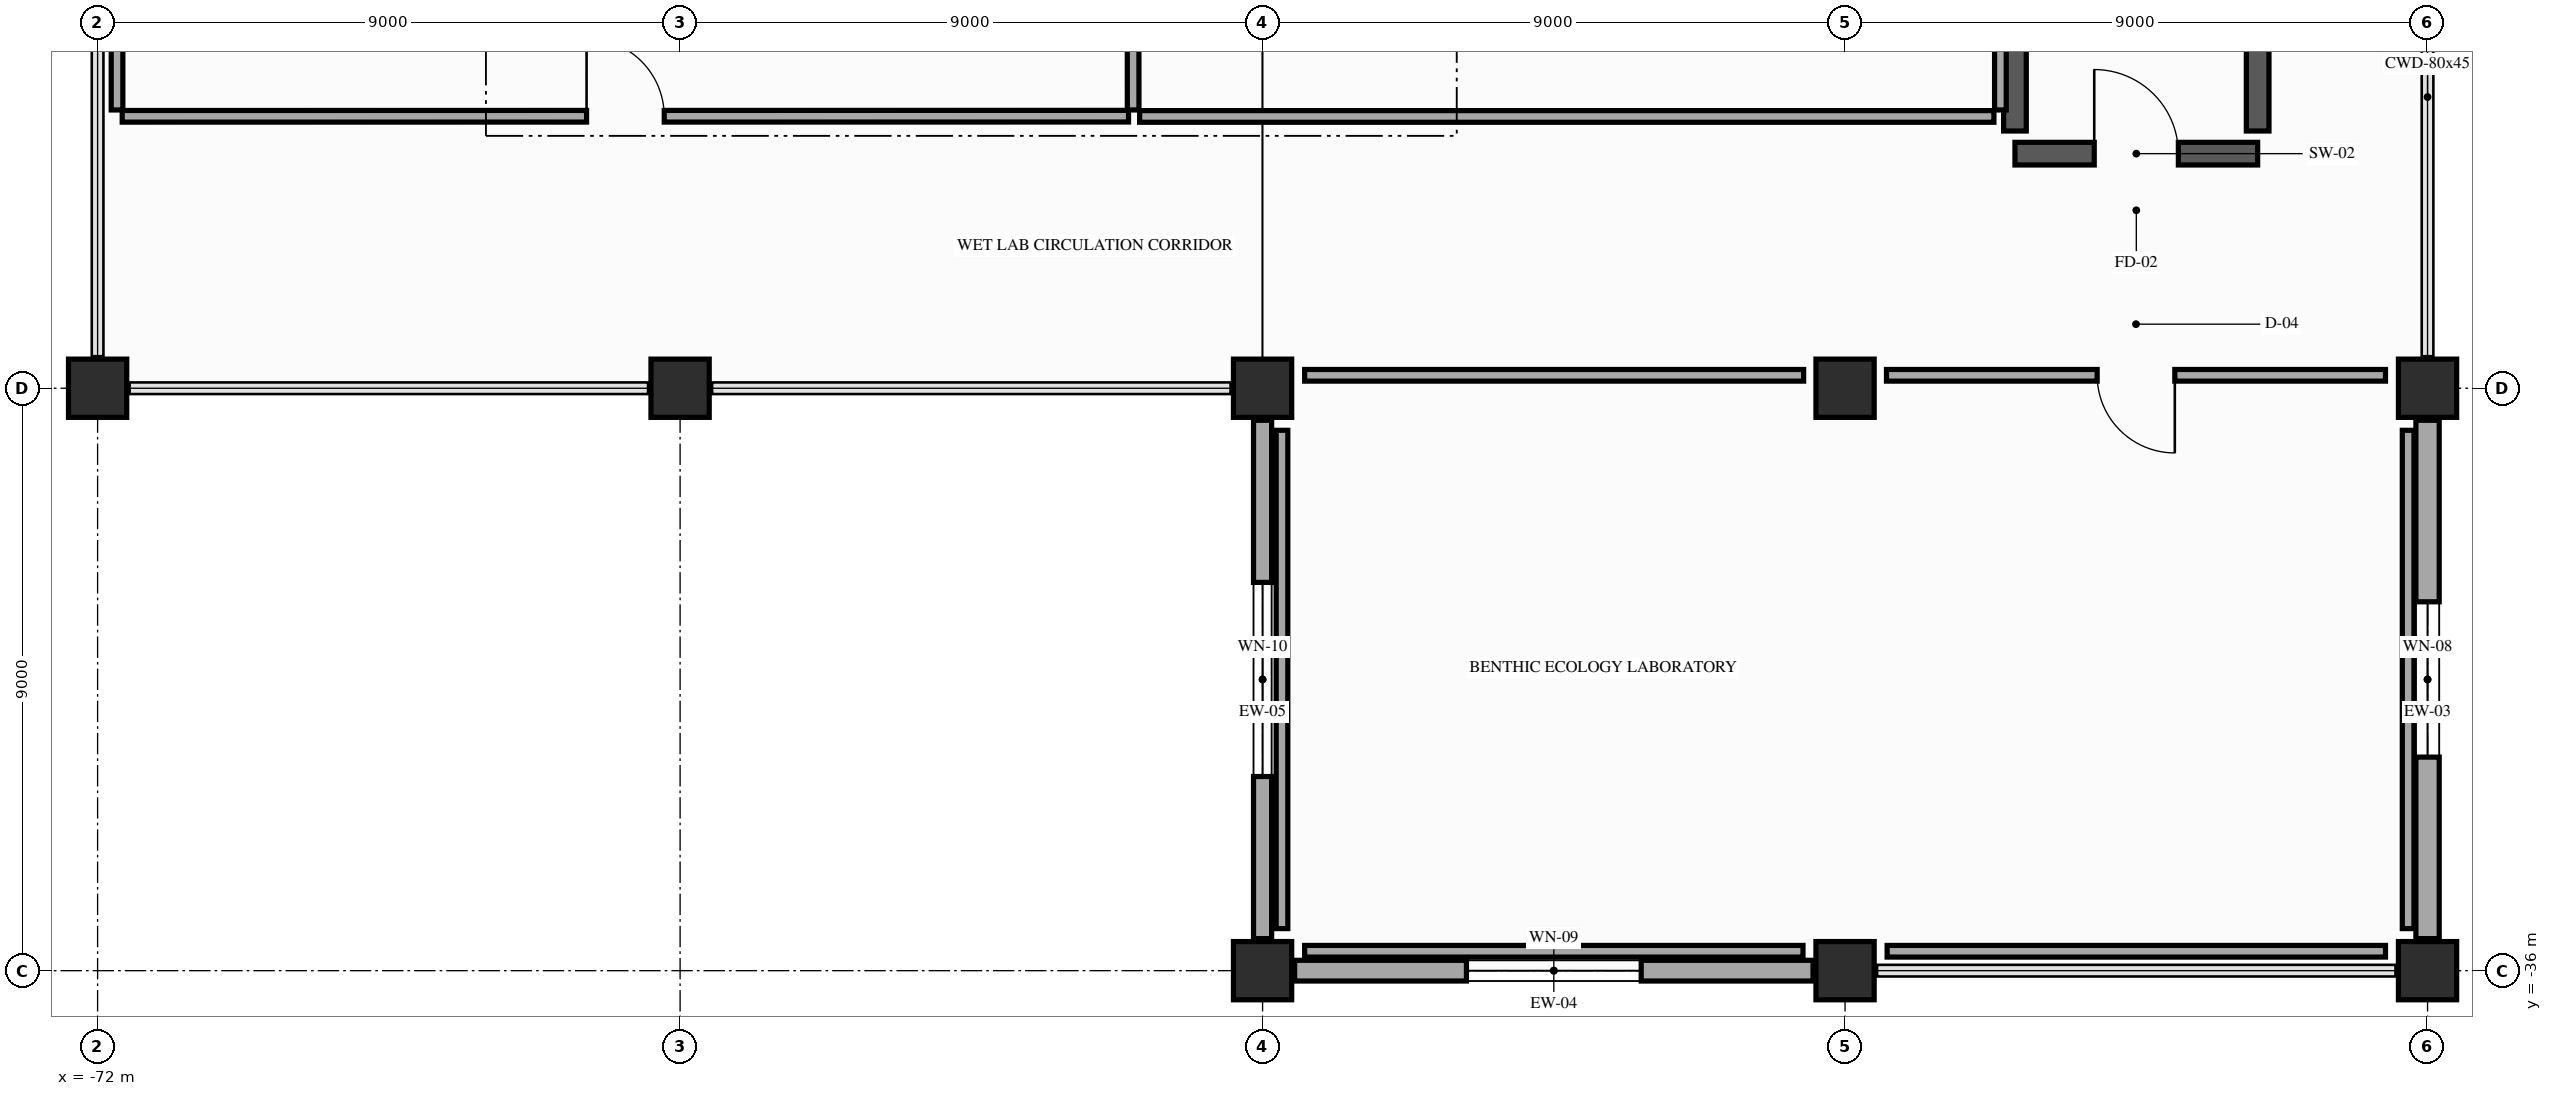
"""IFC4 building model, lengths in metres.
Left out: names, types, materials, properties, quantities, classifications, styles, units other than length and angle.
Written with IfcOpenShell. Run it as: python <this file> out.ifc"""

import sys

from ifc_helpers import new_model, si_unit, direction, frame, frame_2d, origin, origin_2d, place, context, subcontext, project, spatial, rectangle, extrude, element, fill, save


model = new_model("IFC4")
c1 = context("Model", 3, precision=1e-05, world=origin(), true_north=direction((0.0, 1.0)))
c2 = subcontext(c1, "Body", "Model", "MODEL_VIEW")
j1 = project(units=[si_unit("LENGTHUNIT", "METRE"), si_unit("PLANEANGLEUNIT", "RADIAN")], contexts=[c1])
p1 = place(None, origin())
s1 = spatial("IfcSite", under=j1, at=p1, CompositionType="ELEMENT")
p2 = place(p1, origin())
s2 = spatial("IfcBuilding", under=s1, at=p2, CompositionType="ELEMENT")
p3 = place(p2, frame((0.0, 0.0, 5.4)))
s3 = spatial("IfcBuildingStorey", under=s2, at=p3, CompositionType="ELEMENT", Elevation=5.4)
for number, where, z_axis, x_axis in (
    (1, (-72.0, -27.0, 0.0), (0.0, 0.0, 1.0), (1.0, 0.0, 0.0)),
    (2, (-63.0, -27.0, 0.0), (0.0, 0.0, 1.0), (1.0, 0.0, 0.0)),
    (3, (-54.0, -36.0, 0.0), (0.0, 0.0, 1.0), (1.0, 0.0, 0.0)),
    (4, (-54.0, -27.0, 0.0), (0.0, 0.0, 1.0), (1.0, 0.0, 0.0)),
    (5, (-45.0, -36.0, 0.0), (0.0, 0.0, 1.0), (1.0, 0.0, 0.0)),
    (6, (-45.0, -27.0, 0.0), (0.0, 0.0, 1.0), (1.0, 0.0, 0.0)),
    (7, (-36.0, -36.0, 0.0), (0.0, 0.0, 1.0), (1.0, 0.0, 0.0)),
    (8, (-36.0, -27.0, 0.0), (0.0, 0.0, 1.0), (1.0, 0.0, 0.0)),
):
    element("IfcColumn", number, at=place(p3, frame(where, z_axis=z_axis, x_axis=x_axis)), inside=s3, PredefinedType="COLUMN", context=c2, shape_type="SweptSolid", body=[
        extrude(rectangle(XDim=0.9, YDim=0.9, at=origin_2d()), origin(), (0.0, 0.0, 1.0), 5.4),
    ])
p4 = place(p3, frame((-36.0, -27.495, 0.0), z_axis=(0.0, 0.0, 1.0), x_axis=(0.0, -1.0, 0.0)))
e9 = element("IfcWall", 9, at=p4, inside=s3, PredefinedType="SOLIDWALL", context=c2, shape_type="SweptSolid", body=[
    extrude(rectangle(XDim=8.01, YDim=0.36, at=frame_2d((4.005, 0.0))), origin(), (0.0, 0.0, 1.0), 4.525),
])
p5 = place(p4, frame((2.805, 0.0, 0.9)))
e10 = element("IfcOpeningElement", 10, at=p5, cuts=e9, PredefinedType="OPENING", context=c2, shape_type="SweptSolid", body=[
    extrude(rectangle(XDim=2.4, YDim=2.4, at=frame_2d((1.2, 1.2))), frame((0.0, 0.19, 0.0), z_axis=(0.0, -1.0, 0.0), x_axis=(1.0, 0.0, 0.0)), (0.0, 0.0, 1.0), 0.38),
])
p6 = place(p3, frame((-45.495, -36.0, 0.0), z_axis=(0.0, 0.0, 1.0), x_axis=(-1.0, 0.0, 0.0)))
e11 = element("IfcWall", 11, at=p6, inside=s3, PredefinedType="SOLIDWALL", context=c2, shape_type="SweptSolid", body=[
    extrude(rectangle(XDim=8.01, YDim=0.32, at=frame_2d((4.005, 0.0))), origin(), (0.0, 0.0, 1.0), 4.525),
])
p7 = place(p6, frame((2.655, 0.0, 0.9)))
e12 = element("IfcOpeningElement", 12, at=p7, cuts=e11, PredefinedType="OPENING", context=c2, shape_type="SweptSolid", body=[
    extrude(rectangle(XDim=2.7, YDim=2.2, at=frame_2d((1.35, 1.1))), frame((0.0, 0.17, 0.0), z_axis=(0.0, -1.0, 0.0), x_axis=(1.0, 0.0, 0.0)), (0.0, 0.0, 1.0), 0.34),
])
p8 = place(p3, frame((-54.0, -35.505, 0.0), z_axis=(0.0, 0.0, 1.0), x_axis=(0.0, 1.0, 0.0)))
e13 = element("IfcWall", 13, at=p8, inside=s3, PredefinedType="SOLIDWALL", context=c2, shape_type="SweptSolid", body=[
    extrude(rectangle(XDim=8.01, YDim=0.28, at=frame_2d((4.005, 0.0))), origin(), (0.0, 0.0, 1.0), 4.525),
])
p9 = place(p8, frame((2.505, 0.0, 0.9)))
e14 = element("IfcOpeningElement", 14, at=p9, cuts=e13, PredefinedType="OPENING", context=c2, shape_type="SweptSolid", body=[
    extrude(rectangle(XDim=3.0, YDim=2.0, at=frame_2d((1.5, 1.0))), frame((0.0, 0.15, 0.0), z_axis=(0.0, -1.0, 0.0), x_axis=(1.0, 0.0, 0.0)), (0.0, 0.0, 1.0), 0.3),
])
p10 = place(p3, frame((-42.375, -23.375, 0.0), z_axis=(0.0, 0.0, 1.0), x_axis=(1.0, 0.0, 0.0)))
e15 = element("IfcWall", 15, at=p10, inside=s3, PredefinedType="SHEAR", context=c2, shape_type="SweptSolid", body=[
    extrude(rectangle(XDim=3.75, YDim=0.35, at=frame_2d((1.875, 0.0))), origin(), (0.0, 0.0, 1.0), 5.15),
])
p11 = place(p10, frame((1.225, 0.0, 0.0)))
e16 = element("IfcOpeningElement", 16, at=p11, cuts=e15, PredefinedType="OPENING", context=c2, shape_type="SweptSolid", body=[
    extrude(rectangle(XDim=1.3, YDim=2.2, at=frame_2d((0.65, 1.1))), frame((0.0, 0.185, 0.0), z_axis=(0.0, -1.0, 0.0), x_axis=(1.0, 0.0, 0.0)), (0.0, 0.0, 1.0), 0.37),
])
for number, where, z_axis, x_axis in (
    (17, (-42.375, -23.025, 0.0), (0.0, 0.0, 1.0), (0.0, 1.0, 0.0)),
    (18, (-38.625, -23.025, 0.0), (0.0, 0.0, 1.0), (0.0, 1.0, 0.0)),
):
    element("IfcWall", number, at=place(p3, frame(where, z_axis=z_axis, x_axis=x_axis)), inside=s3, PredefinedType="SHEAR", context=c2, shape_type="SweptSolid", body=[
        extrude(rectangle(XDim=9.1, YDim=0.35, at=frame_2d((4.55, 0.0))), origin(), (0.0, 0.0, 1.0), 5.15),
    ])
p12 = place(p3, frame((-71.7, -18.65, 0.0), z_axis=(0.0, 0.0, 1.0), x_axis=(0.0, -1.0, 0.0)))
e19 = element("IfcWall", 19, at=p12, inside=s3, PredefinedType="PARTITIONING", context=c2, shape_type="SweptSolid", body=[
    extrude(rectangle(XDim=4.05, YDim=0.18, at=frame_2d((2.025, 0.0))), origin(), (0.0, 0.0, 1.0), 4.525),
])
p13 = place(p3, frame((-71.62, -22.798, 0.0), z_axis=(0.0, 0.0, 1.0), x_axis=(0.999999990016, 0.000141311685, 0.0)))
e20 = element("IfcWall", 20, at=p13, inside=s3, PredefinedType="PARTITIONING", context=c2, shape_type="SweptSolid", body=[
    extrude(rectangle(XDim=15.549, YDim=0.18, at=frame_2d((7.774, 0.0))), origin(), (0.0, 0.0, 1.0), 4.525),
])
p14 = place(p13, frame((7.175, 0.0, 0.0)))
e21 = element("IfcOpeningElement", 21, at=p14, cuts=e20, PredefinedType="OPENING", context=c2, shape_type="SweptSolid", body=[
    extrude(rectangle(XDim=1.2, YDim=2.2, at=frame_2d((0.6, 1.1))), frame((0.0, 0.1, 0.0), z_axis=(0.0, -1.0, 0.0), x_axis=(1.0, 0.0, 0.0)), (0.0, 0.0, 1.0), 0.2),
])
p15 = place(p3, frame((-56.0, -22.7, 0.0), z_axis=(0.0, 0.0, 1.0), x_axis=(-0.000293067118, 0.999999957056, 0.0)))
e22 = element("IfcWall", 22, at=p15, inside=s3, PredefinedType="PARTITIONING", context=c2, shape_type="SweptSolid", body=[
    extrude(rectangle(XDim=13.329, YDim=0.18, at=frame_2d((6.665, 0.0))), origin(), (0.0, 0.0, 1.0), 4.525),
])
p16 = place(p15, frame((2.066, 0.0, 0.0)))
e23 = element("IfcOpeningElement", 23, at=p16, cuts=e22, PredefinedType="OPENING", context=c2, shape_type="SweptSolid", body=[
    extrude(rectangle(XDim=1.2, YDim=2.2, at=frame_2d((0.6, 1.1))), frame((0.0, 0.1, 0.0), z_axis=(0.0, -1.0, 0.0), x_axis=(1.0, 0.0, 0.0)), (0.0, 0.0, 1.0), 0.2),
])
p17 = place(p3, frame((-55.9, -22.8, 0.0), z_axis=(0.0, 0.0, 1.0), x_axis=(1.0, 0.0, 0.0)))
e24 = element("IfcWall", 24, at=p17, inside=s3, PredefinedType="PARTITIONING", context=c2, shape_type="SweptSolid", body=[
    extrude(rectangle(XDim=13.2, YDim=0.18, at=frame_2d((6.6, 0.0))), origin(), (0.0, 0.0, 1.0), 4.525),
])
p18 = place(p3, frame((-42.6, -22.7, 0.0), z_axis=(0.0, 0.0, 1.0), x_axis=(0.0, 1.0, 0.0)))
e25 = element("IfcWall", 25, at=p18, inside=s3, PredefinedType="PARTITIONING", context=c2, shape_type="SweptSolid", body=[
    extrude(rectangle(XDim=13.3, YDim=0.18, at=frame_2d((6.65, 0.0))), origin(), (0.0, 0.0, 1.0), 4.525),
])
for number, where, z_axis, x_axis in (
    (26, (-53.35, -35.7, 0.0), (0.0, 0.0, 1.0), (1.0, 0.0, 0.0)),
    (27, (-44.35, -35.7, 0.0), (0.0, 0.0, 1.0), (1.0, 0.0, 0.0)),
    (28, (-36.3, -35.35, 0.0), (0.0, 0.0, 1.0), (0.0, 1.0, 0.0)),
):
    element("IfcWall", number, at=place(p3, frame(where, z_axis=z_axis, x_axis=x_axis)), inside=s3, PredefinedType="PARTITIONING", context=c2, shape_type="SweptSolid", body=[
        extrude(rectangle(XDim=7.7, YDim=0.18, at=frame_2d((3.85, 0.0))), origin(), (0.0, 0.0, 1.0), 4.525),
    ])
p19 = place(p3, frame((-36.65, -26.8, 0.0), z_axis=(0.0, 0.0, 1.0), x_axis=(-1.0, 0.0, 0.0)))
e29 = element("IfcWall", 29, at=p19, inside=s3, PredefinedType="PARTITIONING", context=c2, shape_type="SweptSolid", body=[
    extrude(rectangle(XDim=7.71, YDim=0.18, at=frame_2d((3.855, 0.0))), origin(), (0.0, 0.0, 1.0), 4.525),
])
p20 = place(p19, frame((3.255, 0.0, 0.0)))
e30 = element("IfcOpeningElement", 30, at=p20, cuts=e29, PredefinedType="OPENING", context=c2, shape_type="SweptSolid", body=[
    extrude(rectangle(XDim=1.2, YDim=2.2, at=frame_2d((0.6, 1.1))), frame((0.0, 0.1, 0.0), z_axis=(0.0, -1.0, 0.0), x_axis=(1.0, 0.0, 0.0)), (0.0, 0.0, 1.0), 0.2),
])
p21 = place(p3, frame((-45.64, -26.8, 0.0), z_axis=(0.0, 0.0, 1.0), x_axis=(-1.0, 0.0, 0.0)))
e31 = element("IfcWall", 31, at=p21, inside=s3, PredefinedType="PARTITIONING", context=c2, shape_type="SweptSolid", body=[
    extrude(rectangle(XDim=7.71, YDim=0.18, at=frame_2d((3.855, 0.0))), origin(), (0.0, 0.0, 1.0), 4.525),
])
p22 = place(p3, frame((-53.7, -27.65, 0.0), z_axis=(0.0, 0.0, 1.0), x_axis=(0.0, -1.0, 0.0)))
e32 = element("IfcWall", 32, at=p22, inside=s3, PredefinedType="PARTITIONING", context=c2, shape_type="SweptSolid", body=[
    extrude(rectangle(XDim=7.7, YDim=0.18, at=frame_2d((3.85, 0.0))), origin(), (0.0, 0.0, 1.0), 4.525),
])
p23 = place(p5, origin())
e33 = element("IfcWindow", 33, at=p23, inside=s3, PartitioningType="SINGLE_PANEL", PredefinedType="WINDOW", context=c2, shape_type="SweptSolid", body=[
    extrude(rectangle(XDim=2.4, YDim=2.4, at=frame_2d((1.2, 1.2))), frame((0.0, 0.03, 0.0), z_axis=(0.0, -1.0, 0.0), x_axis=(1.0, 0.0, 0.0)), (0.0, 0.0, 1.0), 0.06),
])
fill(e10, e33)
p24 = place(p7, origin())
e34 = element("IfcWindow", 34, at=p24, inside=s3, PartitioningType="SINGLE_PANEL", PredefinedType="WINDOW", context=c2, shape_type="SweptSolid", body=[
    extrude(rectangle(XDim=2.7, YDim=2.2, at=frame_2d((1.35, 1.1))), frame((0.0, 0.03, 0.0), z_axis=(0.0, -1.0, 0.0), x_axis=(1.0, 0.0, 0.0)), (0.0, 0.0, 1.0), 0.06),
])
fill(e12, e34)
p25 = place(p9, origin())
e35 = element("IfcWindow", 35, at=p25, inside=s3, PartitioningType="SINGLE_PANEL", PredefinedType="WINDOW", context=c2, shape_type="SweptSolid", body=[
    extrude(rectangle(XDim=3.0, YDim=2.0, at=frame_2d((1.5, 1.0))), frame((0.0, 0.03, 0.0), z_axis=(0.0, -1.0, 0.0), x_axis=(1.0, 0.0, 0.0)), (0.0, 0.0, 1.0), 0.06),
])
fill(e14, e35)
p26 = place(p11, origin())
e36 = element("IfcDoor", 36, at=p26, inside=s3, OperationType="SINGLE_SWING_LEFT", PredefinedType="DOOR", context=c2, shape_type="SweptSolid", body=[
    extrude(rectangle(XDim=1.3, YDim=2.2, at=frame_2d((0.65, 1.1))), frame((0.0, 0.025, 0.0), z_axis=(0.0, -1.0, 0.0), x_axis=(1.0, 0.0, 0.0)), (0.0, 0.0, 1.0), 0.05),
])
fill(e16, e36)
p27 = place(p14, origin())
e37 = element("IfcDoor", 37, at=p27, inside=s3, OperationType="SINGLE_SWING_LEFT", PredefinedType="DOOR", context=c2, shape_type="SweptSolid", body=[
    extrude(rectangle(XDim=1.2, YDim=2.2, at=frame_2d((0.6, 1.1))), frame((0.0, 0.025, 0.0), z_axis=(0.0, -1.0, 0.0), x_axis=(1.0, 0.0, 0.0)), (0.0, 0.0, 1.0), 0.05),
])
fill(e21, e37)
p28 = place(p20, origin())
e38 = element("IfcDoor", 38, at=p28, inside=s3, OperationType="SINGLE_SWING_LEFT", PredefinedType="DOOR", context=c2, shape_type="SweptSolid", body=[
    extrude(rectangle(XDim=1.2, YDim=2.2, at=frame_2d((0.6, 1.1))), frame((0.0, 0.025, 0.0), z_axis=(0.0, -1.0, 0.0), x_axis=(1.0, 0.0, 0.0)), (0.0, 0.0, 1.0), 0.05),
])
fill(e30, e38)
save(model, sys.argv[1])
